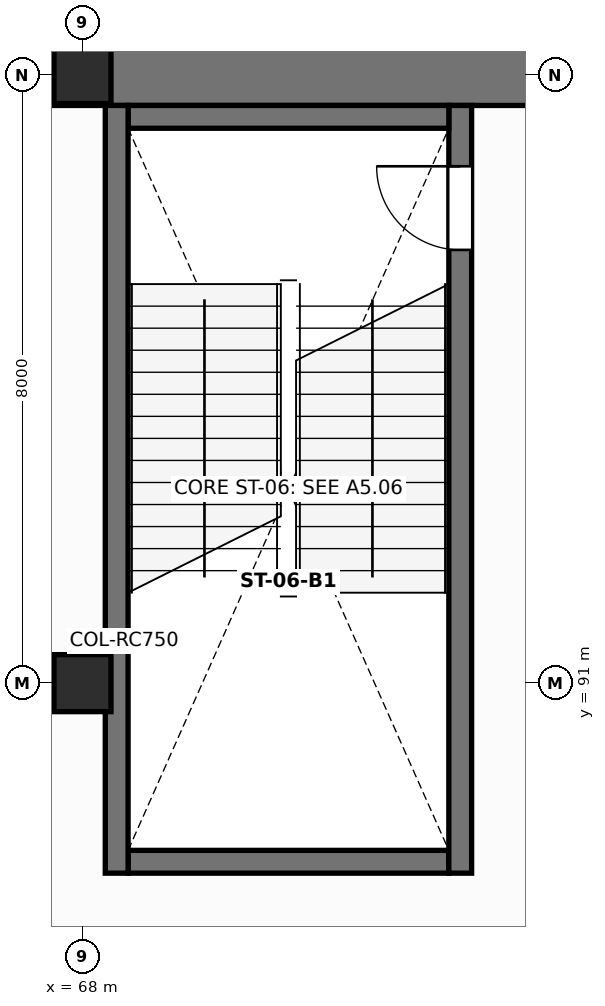
"""IFC4 building model, lengths in metres.
Left out: names, types, materials, properties, quantities, classifications, styles, units other than length and angle.
Written with IfcOpenShell. Run it as: python <this file> out.ifc"""

import sys

from ifc_helpers import new_model, si_unit, direction, frame, frame_2d, origin, origin_2d, place, context, subcontext, project, spatial, rectangle, extrude, element, fill, save


model = new_model("IFC4")
c1 = context("Model", 3, precision=1e-05, world=origin(), true_north=direction((0.0, 1.0)))
c2 = subcontext(c1, "Body", "Model", "MODEL_VIEW")
j1 = project(units=[si_unit("LENGTHUNIT", "METRE"), si_unit("PLANEANGLEUNIT", "RADIAN")], contexts=[c1])
p1 = place(None, origin())
s1 = spatial("IfcSite", under=j1, at=p1, CompositionType="ELEMENT")
p2 = place(p1, origin())
s2 = spatial("IfcBuilding", under=s1, at=p2, CompositionType="ELEMENT")
p3 = place(p2, frame((0.0, 0.0, -5.6)))
s3 = spatial("IfcBuildingStorey", under=s2, at=p3, CompositionType="ELEMENT", Elevation=-5.6)
p4 = place(p3, frame((44.4, 99.0, 0.0), z_axis=(0.0, 0.0, 1.0), x_axis=(1.0, 0.0, 0.0)))
e1 = element("IfcWall", 1, at=p4, inside=s3, PredefinedType="SOLIDWALL", context=c2, shape_type="SweptSolid", body=[
    extrude(rectangle(XDim=55.2, YDim=0.8, at=frame_2d((27.6, 0.0))), origin(), (0.0, 0.0, 1.0), 5.18),
])
for number, where, z_axis, x_axis in (
    (2, (68.0, 91.0, 0.0), (0.0, 0.0, 1.0), (1.0, 0.0, 0.0)),
    (3, (68.0, 99.0, 0.0), (0.0, 0.0, 1.0), (1.0, 0.0, 0.0)),
):
    element("IfcColumn", number, at=place(p3, frame(where, z_axis=z_axis, x_axis=x_axis)), inside=s3, PredefinedType="COLUMN", context=c2, shape_type="SweptSolid", body=[
        extrude(rectangle(XDim=0.75, YDim=0.75, at=origin_2d()), origin(), (0.0, 0.0, 1.0), 5.6),
    ])
p5 = place(p3, frame((68.6, 88.65, 0.0), z_axis=(0.0, 0.0, 1.0), x_axis=(1.0, 0.0, 0.0)))
e4 = element("IfcWall", 4, at=p5, inside=s3, PredefinedType="SHEAR", context=c2, shape_type="SweptSolid", body=[
    extrude(rectangle(XDim=4.22, YDim=0.3, at=frame_2d((2.11, 0.0))), origin(), (0.0, 0.0, 1.0), 5.275),
])
p6 = place(p3, frame((72.97, 88.5, 0.0), z_axis=(0.0, 0.0, 1.0), x_axis=(0.0, 1.0, 0.0)))
e5 = element("IfcWall", 5, at=p6, inside=s3, PredefinedType="SHEAR", context=c2, shape_type="SweptSolid", body=[
    extrude(rectangle(XDim=10.1, YDim=0.3, at=frame_2d((5.05, 0.0))), origin(), (0.0, 0.0, 1.0), 5.275),
])
p7 = place(p6, frame((8.2, 0.0, 0.0)))
e6 = element("IfcOpeningElement", 6, at=p7, cuts=e5, PredefinedType="OPENING", context=c2, shape_type="SweptSolid", body=[
    extrude(rectangle(XDim=1.1, YDim=2.15, at=frame_2d((0.55, 1.075))), frame((0.0, 0.16, 0.0), z_axis=(0.0, -1.0, 0.0), x_axis=(1.0, 0.0, 0.0)), (0.0, 0.0, 1.0), 0.32),
])
p8 = place(p3, frame((72.82, 98.45, 0.0), z_axis=(0.0, 0.0, 1.0), x_axis=(-1.0, 0.0, 0.0)))
e7 = element("IfcWall", 7, at=p8, inside=s3, PredefinedType="SHEAR", context=c2, shape_type="SweptSolid", body=[
    extrude(rectangle(XDim=4.22, YDim=0.3, at=frame_2d((2.11, 0.0))), origin(), (0.0, 0.0, 1.0), 5.275),
])
p9 = place(p3, frame((68.45, 98.6, 0.0), z_axis=(0.0, 0.0, 1.0), x_axis=(0.0, -1.0, 0.0)))
e8 = element("IfcWall", 8, at=p9, inside=s3, PredefinedType="SHEAR", context=c2, shape_type="SweptSolid", body=[
    extrude(rectangle(XDim=10.1, YDim=0.3, at=frame_2d((5.05, 0.0))), origin(), (0.0, 0.0, 1.0), 5.275),
])
p10 = place(p7, origin())
e9 = element("IfcDoor", 9, at=p10, inside=s3, OperationType="SINGLE_SWING_RIGHT", PredefinedType="DOOR", context=c2, shape_type="SweptSolid", body=[
    extrude(rectangle(XDim=1.1, YDim=2.15, at=frame_2d((0.55, 1.075))), frame((0.0, 0.025, 0.0), z_axis=(0.0, -1.0, 0.0), x_axis=(1.0, 0.0, 0.0)), (0.0, 0.0, 1.0), 0.05),
])
fill(e6, e9)
save(model, sys.argv[1])
